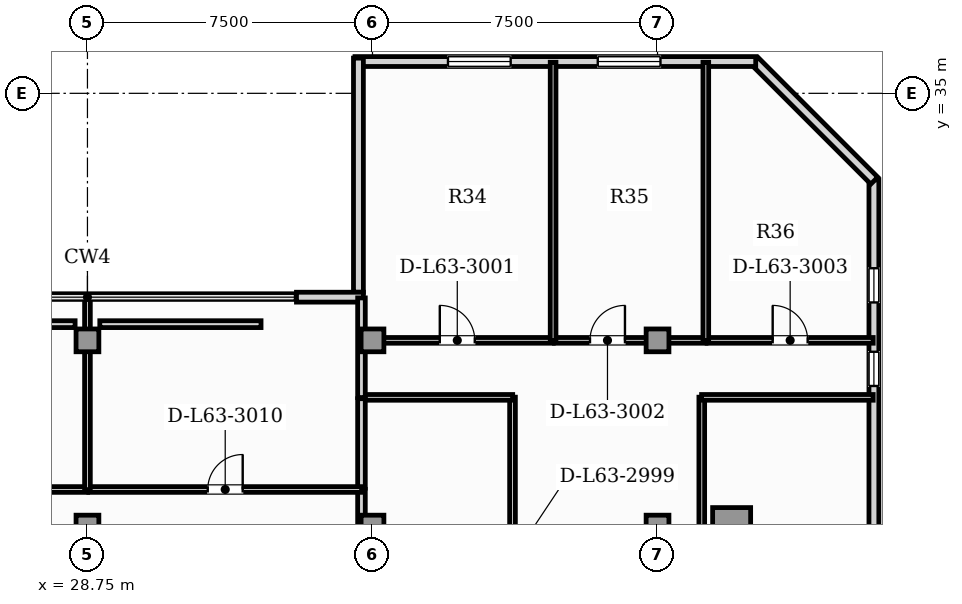
"""IFC4 building model, lengths in metres.
Left out: names, types, materials, properties, quantities, classifications, styles, units other than length and angle.
Written with IfcOpenShell. Run it as: python <this file> out.ifc"""

import sys

from ifc_helpers import new_model, si_unit, direction, frame, frame_2d, origin, origin_2d, place, context, subcontext, project, spatial, rectangle, hollow_rectangle, extrude, element, fill, save


model = new_model("IFC4")
c1 = context("Model", 3, precision=1e-05, world=origin(), true_north=direction((0.0, 1.0)))
c2 = subcontext(c1, "Body", "Model", "MODEL_VIEW")
j1 = project(units=[si_unit("LENGTHUNIT", "METRE"), si_unit("PLANEANGLEUNIT", "RADIAN")], contexts=[c1])
p1 = place(None, origin())
s1 = spatial("IfcSite", under=j1, at=p1, CompositionType="ELEMENT")
p2 = place(p1, origin())
s2 = spatial("IfcBuilding", under=s1, at=p2, CompositionType="ELEMENT")
p3 = place(p2, frame((0.0, 0.0, 256.75)))
s3 = spatial("IfcBuildingStorey", under=s2, at=p3, CompositionType="ELEMENT", Elevation=256.75)
p4 = place(p3, frame((45.7, 23.6, 0.0), z_axis=(0.0, 0.0, 1.0), x_axis=(1.0, 0.0, 0.0)))
e1 = element("IfcColumn", 1, at=p4, inside=s3, PredefinedType="USERDEFINED", context=c2, shape_type="SweptSolid", body=[
    extrude(hollow_rectangle(XDim=1.0, YDim=1.0, WallThickness=0.06, at=origin_2d()), origin(), (0.0, 0.0, 1.0), 3.85),
])
for number, where, z_axis, x_axis in (
    (2, (28.75, 23.6, 0.0), (0.0, 0.0, 1.0), (1.0, 0.0, 0.0)),
    (3, (36.25, 23.6, 0.0), (0.0, 0.0, 1.0), (1.0, 0.0, 0.0)),
    (4, (43.75, 23.6, 0.0), (0.0, 0.0, 1.0), (1.0, 0.0, 0.0)),
    (5, (28.75, 28.5, 0.0), (0.0, 0.0, 1.0), (1.0, 0.0, 0.0)),
    (6, (36.25, 28.5, 0.0), (0.0, 0.0, 1.0), (1.0, 0.0, 0.0)),
    (7, (43.75, 28.5, 0.0), (0.0, 0.0, 1.0), (1.0, 0.0, 0.0)),
):
    element("IfcColumn", number, at=place(p3, frame(where, z_axis=z_axis, x_axis=x_axis)), inside=s3, PredefinedType="COLUMN", context=c2, shape_type="SweptSolid", body=[
        extrude(rectangle(XDim=0.6, YDim=0.6, at=origin_2d()), origin(), (0.0, 0.0, 1.0), 3.85),
    ])
p5 = place(p3, frame((49.443, 3.24, 0.0), z_axis=(0.0, 0.0, 1.0), x_axis=(0.0, 1.0, 0.0)))
e8 = element("IfcWall", 8, at=p5, inside=s3, PredefinedType="SOLIDWALL", context=c2, shape_type="SweptSolid", body=[
    extrude(rectangle(XDim=29.486, YDim=0.26, at=frame_2d((14.743, 0.0))), origin(), (0.0, 0.0, 1.0), 3.19),
])
p6 = place(p5, frame((24.06, 0.0, 0.85)))
e9 = element("IfcOpeningElement", 9, at=p6, cuts=e8, PredefinedType="OPENING", context=c2, shape_type="SweptSolid", body=[
    extrude(rectangle(XDim=0.9, YDim=1.4, at=frame_2d((0.45, 0.7))), frame((0.0, 0.14, 0.0), z_axis=(0.0, -1.0, 0.0), x_axis=(1.0, 0.0, 0.0)), (0.0, 0.0, 1.0), 0.28),
])
p7 = place(p5, frame((11.531, 0.0, 0.85)))
e10 = element("IfcOpeningElement", 10, at=p7, cuts=e8, PredefinedType="OPENING", context=c2, shape_type="SweptSolid", body=[
    extrude(rectangle(XDim=0.9, YDim=1.4, at=frame_2d((0.45, 0.7))), frame((0.0, 0.14, 0.0), z_axis=(0.0, -1.0, 0.0), x_axis=(1.0, 0.0, 0.0)), (0.0, 0.0, 1.0), 0.28),
])
p8 = place(p5, frame((18.116, 0.0, 0.85)))
e11 = element("IfcOpeningElement", 11, at=p8, cuts=e8, PredefinedType="OPENING", context=c2, shape_type="SweptSolid", body=[
    extrude(rectangle(XDim=0.9, YDim=1.4, at=frame_2d((0.45, 0.7))), frame((0.0, 0.14, 0.0), z_axis=(0.0, -1.0, 0.0), x_axis=(1.0, 0.0, 0.0)), (0.0, 0.0, 1.0), 0.28),
])
p9 = place(p5, frame((26.258, 0.0, 0.85)))
e12 = element("IfcOpeningElement", 12, at=p9, cuts=e8, PredefinedType="OPENING", context=c2, shape_type="SweptSolid", body=[
    extrude(rectangle(XDim=0.9, YDim=1.4, at=frame_2d((0.45, 0.7))), frame((0.0, 0.14, 0.0), z_axis=(0.0, -1.0, 0.0), x_axis=(1.0, 0.0, 0.0)), (0.0, 0.0, 1.0), 0.28),
])
p10 = place(p3, frame((49.453, 32.703, 0.0), z_axis=(0.0, 0.0, 1.0), x_axis=(-0.707079321262, 0.707134240044, 0.0)))
e13 = element("IfcWall", 13, at=p10, inside=s3, PredefinedType="SOLIDWALL", context=c2, shape_type="SweptSolid", body=[
    extrude(rectangle(XDim=4.446, YDim=0.26, at=frame_2d((2.223, 0.0))), origin(), (0.0, 0.0, 1.0), 3.65),
])
p11 = place(p3, frame((46.333, 35.836, 0.0), z_axis=(0.0, 0.0, 1.0), x_axis=(-1.0, 0.0, 0.0)))
e14 = element("IfcWall", 14, at=p11, inside=s3, PredefinedType="SOLIDWALL", context=c2, shape_type="SweptSolid", body=[
    extrude(rectangle(XDim=10.543, YDim=0.26, at=frame_2d((5.272, 0.0))), origin(), (0.0, 0.0, 1.0), 3.65),
])
p12 = place(p11, frame((6.447, 0.0, 0.88)))
e15 = element("IfcOpeningElement", 15, at=p12, cuts=e14, PredefinedType="OPENING", context=c2, shape_type="SweptSolid", body=[
    extrude(rectangle(XDim=1.65, YDim=2.0, at=frame_2d((0.825, 1.0))), frame((0.0, 0.14, 0.0), z_axis=(0.0, -1.0, 0.0), x_axis=(1.0, 0.0, 0.0)), (0.0, 0.0, 1.0), 0.28),
])
p13 = place(p11, frame((2.506, 0.0, 0.88)))
e16 = element("IfcOpeningElement", 16, at=p13, cuts=e14, PredefinedType="OPENING", context=c2, shape_type="SweptSolid", body=[
    extrude(rectangle(XDim=1.65, YDim=2.0, at=frame_2d((0.825, 1.0))), frame((0.0, 0.14, 0.0), z_axis=(0.0, -1.0, 0.0), x_axis=(1.0, 0.0, 0.0)), (0.0, 0.0, 1.0), 0.28),
])
p14 = place(p3, frame((35.88, 35.926, 0.0), z_axis=(0.0, 0.0, 1.0), x_axis=(0.0, -1.0, 0.0)))
e17 = element("IfcWall", 17, at=p14, inside=s3, PredefinedType="SOLIDWALL", context=c2, shape_type="SweptSolid", body=[
    extrude(rectangle(XDim=6.16, YDim=0.26, at=frame_2d((3.08, 0.0))), origin(), (0.0, 0.0, 1.0), 3.65),
])
p15 = place(p3, frame((34.25, 29.636, 0.0), z_axis=(0.0, 0.0, 1.0), x_axis=(1.0, 0.0, 0.0)))
e18 = element("IfcWall", 18, at=p15, inside=s3, PredefinedType="SOLIDWALL", context=c2, shape_type="SweptSolid", body=[
    extrude(rectangle(XDim=1.76, YDim=0.26, at=frame_2d((0.88, 0.0))), origin(), (0.0, 0.0, 1.0), 3.65),
])
p16 = place(p3, frame((39.934, 18.495, 0.0), z_axis=(0.0, 0.0, 1.0), x_axis=(0.0, 1.0, 0.0)))
e19 = element("IfcWall", 19, at=p16, inside=s3, PredefinedType="PARTITIONING", context=c2, shape_type="SweptSolid", body=[
    extrude(rectangle(XDim=8.51, YDim=0.15, at=frame_2d((4.255, 0.0))), origin(), (0.0, 0.0, 1.0), 3.65),
])
p17 = place(p16, frame((3.795, 0.0, 0.0)))
e20 = element("IfcOpeningElement", 20, at=p17, cuts=e19, PredefinedType="OPENING", context=c2, shape_type="SweptSolid", body=[
    extrude(rectangle(XDim=0.92, YDim=2.1, at=frame_2d((0.46, 1.05))), frame((0.0, 0.085, 0.0), z_axis=(0.0, -1.0, 0.0), x_axis=(1.0, 0.0, 0.0)), (0.0, 0.0, 1.0), 0.17),
])
p18 = place(p3, frame((35.955, 27.0, 0.0), z_axis=(0.0, 0.0, 1.0), x_axis=(1.0, 0.0, 0.0)))
e21 = element("IfcWall", 21, at=p18, inside=s3, PredefinedType="PARTITIONING", context=c2, shape_type="SweptSolid", body=[
    extrude(rectangle(XDim=3.984, YDim=0.15, at=frame_2d((1.992, 0.0))), origin(), (0.0, 0.0, 1.0), 3.65),
])
p19 = place(p3, frame((44.914, 16.607, 0.0), z_axis=(0.0, 0.0, 1.0), x_axis=(0.0, 1.0, 0.0)))
e22 = element("IfcWall", 22, at=p19, inside=s3, PredefinedType="PARTITIONING", context=c2, shape_type="SweptSolid", body=[
    extrude(rectangle(XDim=10.397, YDim=0.15, at=frame_2d((5.199, 0.0))), origin(), (0.0, 0.0, 1.0), 3.65),
])
p20 = place(p19, frame((4.739, 0.0, 0.0)))
e23 = element("IfcOpeningElement", 23, at=p20, cuts=e22, PredefinedType="OPENING", context=c2, shape_type="SweptSolid", body=[
    extrude(rectangle(XDim=0.92, YDim=2.1, at=frame_2d((0.46, 1.05))), frame((0.0, 0.085, 0.0), z_axis=(0.0, -1.0, 0.0), x_axis=(1.0, 0.0, 0.0)), (0.0, 0.0, 1.0), 0.17),
])
p21 = place(p3, frame((44.909, 27.0, 0.0), z_axis=(0.0, 0.0, 1.0), x_axis=(1.0, 0.0, 0.0)))
e24 = element("IfcWall", 24, at=p21, inside=s3, PredefinedType="PARTITIONING", context=c2, shape_type="SweptSolid", body=[
    extrude(rectangle(XDim=4.515, YDim=0.15, at=frame_2d((2.257, 0.0))), origin(), (0.0, 0.0, 1.0), 3.65),
])
p22 = place(p3, frame((35.955, 28.5, 0.0), z_axis=(0.0, 0.0, 1.0), x_axis=(1.0, 0.0, 0.0)))
e25 = element("IfcWall", 25, at=p22, inside=s3, PredefinedType="PARTITIONING", context=c2, shape_type="SweptSolid", body=[
    extrude(rectangle(XDim=5.052, YDim=0.15, at=frame_2d((2.526, 0.0))), origin(), (0.0, 0.0, 1.0), 3.105),
])
p23 = place(p22, frame((2.066, 0.0, 0.0)))
e26 = element("IfcOpeningElement", 26, at=p23, cuts=e25, PredefinedType="OPENING", context=c2, shape_type="SweptSolid", body=[
    extrude(rectangle(XDim=0.92, YDim=2.1, at=frame_2d((0.46, 1.05))), frame((0.0, 0.085, 0.0), z_axis=(0.0, -1.0, 0.0), x_axis=(1.0, 0.0, 0.0)), (0.0, 0.0, 1.0), 0.17),
])
p24 = place(p3, frame((41.037, 28.5, 0.0), z_axis=(0.0, 0.0, 1.0), x_axis=(1.0, 0.0, 0.0)))
e27 = element("IfcWall", 27, at=p24, inside=s3, PredefinedType="PARTITIONING", context=c2, shape_type="SweptSolid", body=[
    extrude(rectangle(XDim=3.989, YDim=0.15, at=frame_2d((1.994, 0.0))), origin(), (0.0, 0.0, 1.0), 3.105),
])
p25 = place(p24, frame((0.936, 0.0, 0.0)))
e28 = element("IfcOpeningElement", 28, at=p25, cuts=e27, PredefinedType="OPENING", context=c2, shape_type="SweptSolid", body=[
    extrude(rectangle(XDim=0.92, YDim=2.1, at=frame_2d((0.46, 1.05))), frame((0.0, 0.085, 0.0), z_axis=(0.0, -1.0, 0.0), x_axis=(1.0, 0.0, 0.0)), (0.0, 0.0, 1.0), 0.17),
])
p26 = place(p3, frame((45.056, 28.5, 0.0), z_axis=(0.0, 0.0, 1.0), x_axis=(1.0, 0.0, 0.0)))
e29 = element("IfcWall", 29, at=p26, inside=s3, PredefinedType="PARTITIONING", context=c2, shape_type="SweptSolid", body=[
    extrude(rectangle(XDim=4.368, YDim=0.15, at=frame_2d((2.184, 0.0))), origin(), (0.0, 0.0, 1.0), 3.65),
])
p27 = place(p26, frame((1.724, 0.0, 0.0)))
e30 = element("IfcOpeningElement", 30, at=p27, cuts=e29, PredefinedType="OPENING", context=c2, shape_type="SweptSolid", body=[
    extrude(rectangle(XDim=0.92, YDim=2.1, at=frame_2d((0.46, 1.05))), frame((0.0, 0.085, 0.0), z_axis=(0.0, -1.0, 0.0), x_axis=(1.0, 0.0, 0.0)), (0.0, 0.0, 1.0), 0.17),
])
p28 = place(p3, frame((35.96, 26.995, 0.0), z_axis=(0.0, 0.0, 1.0), x_axis=(0.0, 1.0, 0.0)))
e31 = element("IfcWall", 31, at=p28, inside=s3, PredefinedType="PARTITIONING", context=c2, shape_type="SweptSolid", body=[
    extrude(rectangle(XDim=2.622, YDim=0.2, at=frame_2d((1.311, 0.0))), origin(), (0.0, 0.0, 1.0), 3.65),
])
p29 = place(p3, frame((35.96, 23.071, 0.0), z_axis=(0.0, 0.0, 1.0), x_axis=(0.0, 1.0, 0.0)))
e32 = element("IfcWall", 32, at=p29, inside=s3, PredefinedType="PARTITIONING", context=c2, shape_type="SweptSolid", body=[
    extrude(rectangle(XDim=1.51, YDim=0.2, at=frame_2d((0.755, 0.0))), origin(), (0.0, 0.0, 1.0), 3.65),
])
p30 = place(p3, frame((35.96, 24.611, 0.0), z_axis=(0.0, 0.0, 1.0), x_axis=(0.0, 1.0, 0.0)))
e33 = element("IfcWall", 33, at=p30, inside=s3, PredefinedType="PARTITIONING", context=c2, shape_type="SweptSolid", body=[
    extrude(rectangle(XDim=2.354, YDim=0.2, at=frame_2d((1.177, 0.0))), origin(), (0.0, 0.0, 1.0), 3.65),
])
for number, where, z_axis, x_axis in (
    (34, (41.002, 28.495, 0.0), (0.0, 0.0, 1.0), (0.0, 1.0, 0.0)),
    (35, (45.021, 28.495, 0.0), (0.0, 0.0, 1.0), (0.0, 1.0, 0.0)),
):
    element("IfcWall", number, at=place(p3, frame(where, z_axis=z_axis, x_axis=x_axis)), inside=s3, PredefinedType="PARTITIONING", context=c2, shape_type="SweptSolid", body=[
        extrude(rectangle(XDim=7.322, YDim=0.15, at=frame_2d((3.661, 0.0))), origin(), (0.0, 0.0, 1.0), 3.65),
    ])
p31 = place(p3, frame((21.535, 24.576, 0.0), z_axis=(0.0, 0.0, 1.0), x_axis=(1.0, 0.0, 0.0)))
e36 = element("IfcWall", 36, at=p31, inside=s3, PredefinedType="PARTITIONING", context=c2, shape_type="SweptSolid", body=[
    extrude(rectangle(XDim=7.22, YDim=0.15, at=frame_2d((3.61, 0.0))), origin(), (0.0, 0.0, 1.0), 3.65),
])
p32 = place(p31, frame((3.15, 0.0, 0.0)))
e37 = element("IfcOpeningElement", 37, at=p32, cuts=e36, PredefinedType="OPENING", context=c2, shape_type="SweptSolid", body=[
    extrude(rectangle(XDim=0.92, YDim=2.1, at=frame_2d((0.46, 1.05))), frame((0.0, 0.085, 0.0), z_axis=(0.0, -1.0, 0.0), x_axis=(1.0, 0.0, 0.0)), (0.0, 0.0, 1.0), 0.17),
])
p33 = place(p3, frame((28.785, 24.576, 0.0), z_axis=(0.0, 0.0, 1.0), x_axis=(1.0, 0.0, 0.0)))
e38 = element("IfcWall", 38, at=p33, inside=s3, PredefinedType="PARTITIONING", context=c2, shape_type="SweptSolid", body=[
    extrude(rectangle(XDim=7.18, YDim=0.15, at=frame_2d((3.59, 0.0))), origin(), (0.0, 0.0, 1.0), 3.65),
])
p34 = place(p33, frame((3.13, 0.0, 0.0)))
e39 = element("IfcOpeningElement", 39, at=p34, cuts=e38, PredefinedType="OPENING", context=c2, shape_type="SweptSolid", body=[
    extrude(rectangle(XDim=0.92, YDim=2.1, at=frame_2d((0.46, 1.05))), frame((0.0, 0.085, 0.0), z_axis=(0.0, -1.0, 0.0), x_axis=(1.0, 0.0, 0.0)), (0.0, 0.0, 1.0), 0.17),
])
p35 = place(p3, frame((28.75, 24.571, 0.0), z_axis=(0.0, 0.0, 1.0), x_axis=(0.0, 1.0, 0.0)))
e40 = element("IfcWall", 40, at=p35, inside=s3, PredefinedType="PARTITIONING", context=c2, shape_type="SweptSolid", body=[
    extrude(rectangle(XDim=5.041, YDim=0.15, at=frame_2d((2.521, 0.0))), origin(), (0.0, 0.0, 1.0), 3.295),
])
for number, where, z_axis, x_axis in (
    (41, (24.183, 28.926, 0.0), (0.0, 0.0, 1.0), (1.0, 0.0, 0.0)),
    (42, (29.075, 28.926, 0.0), (0.0, 0.0, 1.0), (1.0, 0.0, 0.0)),
):
    element("IfcWall", number, at=place(p3, frame(where, z_axis=z_axis, x_axis=x_axis)), inside=s3, PredefinedType="PARTITIONING", context=c2, shape_type="SweptSolid", body=[
        extrude(rectangle(XDim=4.242, YDim=0.18, at=frame_2d((2.121, 0.0))), origin(), (0.0, 0.0, 1.0), 3.65),
    ])
p36 = place(p6, origin())
e43 = element("IfcWindow", 43, at=p36, inside=s3, PartitioningType="SINGLE_PANEL", PredefinedType="WINDOW", context=c2, shape_type="SweptSolid", body=[
    extrude(rectangle(XDim=0.9, YDim=1.4, at=frame_2d((0.45, 0.7))), frame((0.0, 0.03, 0.0), z_axis=(0.0, -1.0, 0.0), x_axis=(1.0, 0.0, 0.0)), (0.0, 0.0, 1.0), 0.06),
])
fill(e9, e43)
p37 = place(p12, origin())
e44 = element("IfcWindow", 44, at=p37, inside=s3, PartitioningType="SINGLE_PANEL", PredefinedType="WINDOW", context=c2, shape_type="SweptSolid", body=[
    extrude(rectangle(XDim=1.65, YDim=2.0, at=frame_2d((0.825, 1.0))), frame((0.0, 0.03, 0.0), z_axis=(0.0, -1.0, 0.0), x_axis=(1.0, 0.0, 0.0)), (0.0, 0.0, 1.0), 0.06),
])
fill(e15, e44)
p38 = place(p13, origin())
e45 = element("IfcWindow", 45, at=p38, inside=s3, PartitioningType="SINGLE_PANEL", PredefinedType="WINDOW", context=c2, shape_type="SweptSolid", body=[
    extrude(rectangle(XDim=1.65, YDim=2.0, at=frame_2d((0.825, 1.0))), frame((0.0, 0.03, 0.0), z_axis=(0.0, -1.0, 0.0), x_axis=(1.0, 0.0, 0.0)), (0.0, 0.0, 1.0), 0.06),
])
fill(e16, e45)
p39 = place(p9, origin())
e46 = element("IfcWindow", 46, at=p39, inside=s3, PartitioningType="SINGLE_PANEL", PredefinedType="WINDOW", context=c2, shape_type="SweptSolid", body=[
    extrude(rectangle(XDim=0.9, YDim=1.4, at=frame_2d((0.45, 0.7))), frame((0.0, 0.03, 0.0), z_axis=(0.0, -1.0, 0.0), x_axis=(1.0, 0.0, 0.0)), (0.0, 0.0, 1.0), 0.06),
])
fill(e12, e46)
p40 = place(p23, origin())
e47 = element("IfcDoor", 47, at=p40, inside=s3, OperationType="SINGLE_SWING_LEFT", PredefinedType="DOOR", context=c2, shape_type="SweptSolid", body=[
    extrude(rectangle(XDim=0.92, YDim=2.1, at=frame_2d((0.46, 1.05))), frame((0.0, 0.025, 0.0), z_axis=(0.0, -1.0, 0.0), x_axis=(1.0, 0.0, 0.0)), (0.0, 0.0, 1.0), 0.05),
])
fill(e26, e47)
p41 = place(p25, origin())
e48 = element("IfcDoor", 48, at=p41, inside=s3, OperationType="SINGLE_SWING_RIGHT", PredefinedType="DOOR", context=c2, shape_type="SweptSolid", body=[
    extrude(rectangle(XDim=0.92, YDim=2.1, at=frame_2d((0.46, 1.05))), frame((0.0, 0.025, 0.0), z_axis=(0.0, -1.0, 0.0), x_axis=(1.0, 0.0, 0.0)), (0.0, 0.0, 1.0), 0.05),
])
fill(e28, e48)
p42 = place(p27, origin())
e49 = element("IfcDoor", 49, at=p42, inside=s3, OperationType="SINGLE_SWING_LEFT", PredefinedType="DOOR", context=c2, shape_type="SweptSolid", body=[
    extrude(rectangle(XDim=0.92, YDim=2.1, at=frame_2d((0.46, 1.05))), frame((0.0, 0.025, 0.0), z_axis=(0.0, -1.0, 0.0), x_axis=(1.0, 0.0, 0.0)), (0.0, 0.0, 1.0), 0.05),
])
fill(e30, e49)
p43 = place(p34, origin())
e50 = element("IfcDoor", 50, at=p43, inside=s3, OperationType="SINGLE_SWING_RIGHT", PredefinedType="DOOR", context=c2, shape_type="SweptSolid", body=[
    extrude(rectangle(XDim=0.92, YDim=2.1, at=frame_2d((0.46, 1.05))), frame((0.0, 0.025, 0.0), z_axis=(0.0, -1.0, 0.0), x_axis=(1.0, 0.0, 0.0)), (0.0, 0.0, 1.0), 0.05),
])
fill(e39, e50)
save(model, sys.argv[1])
